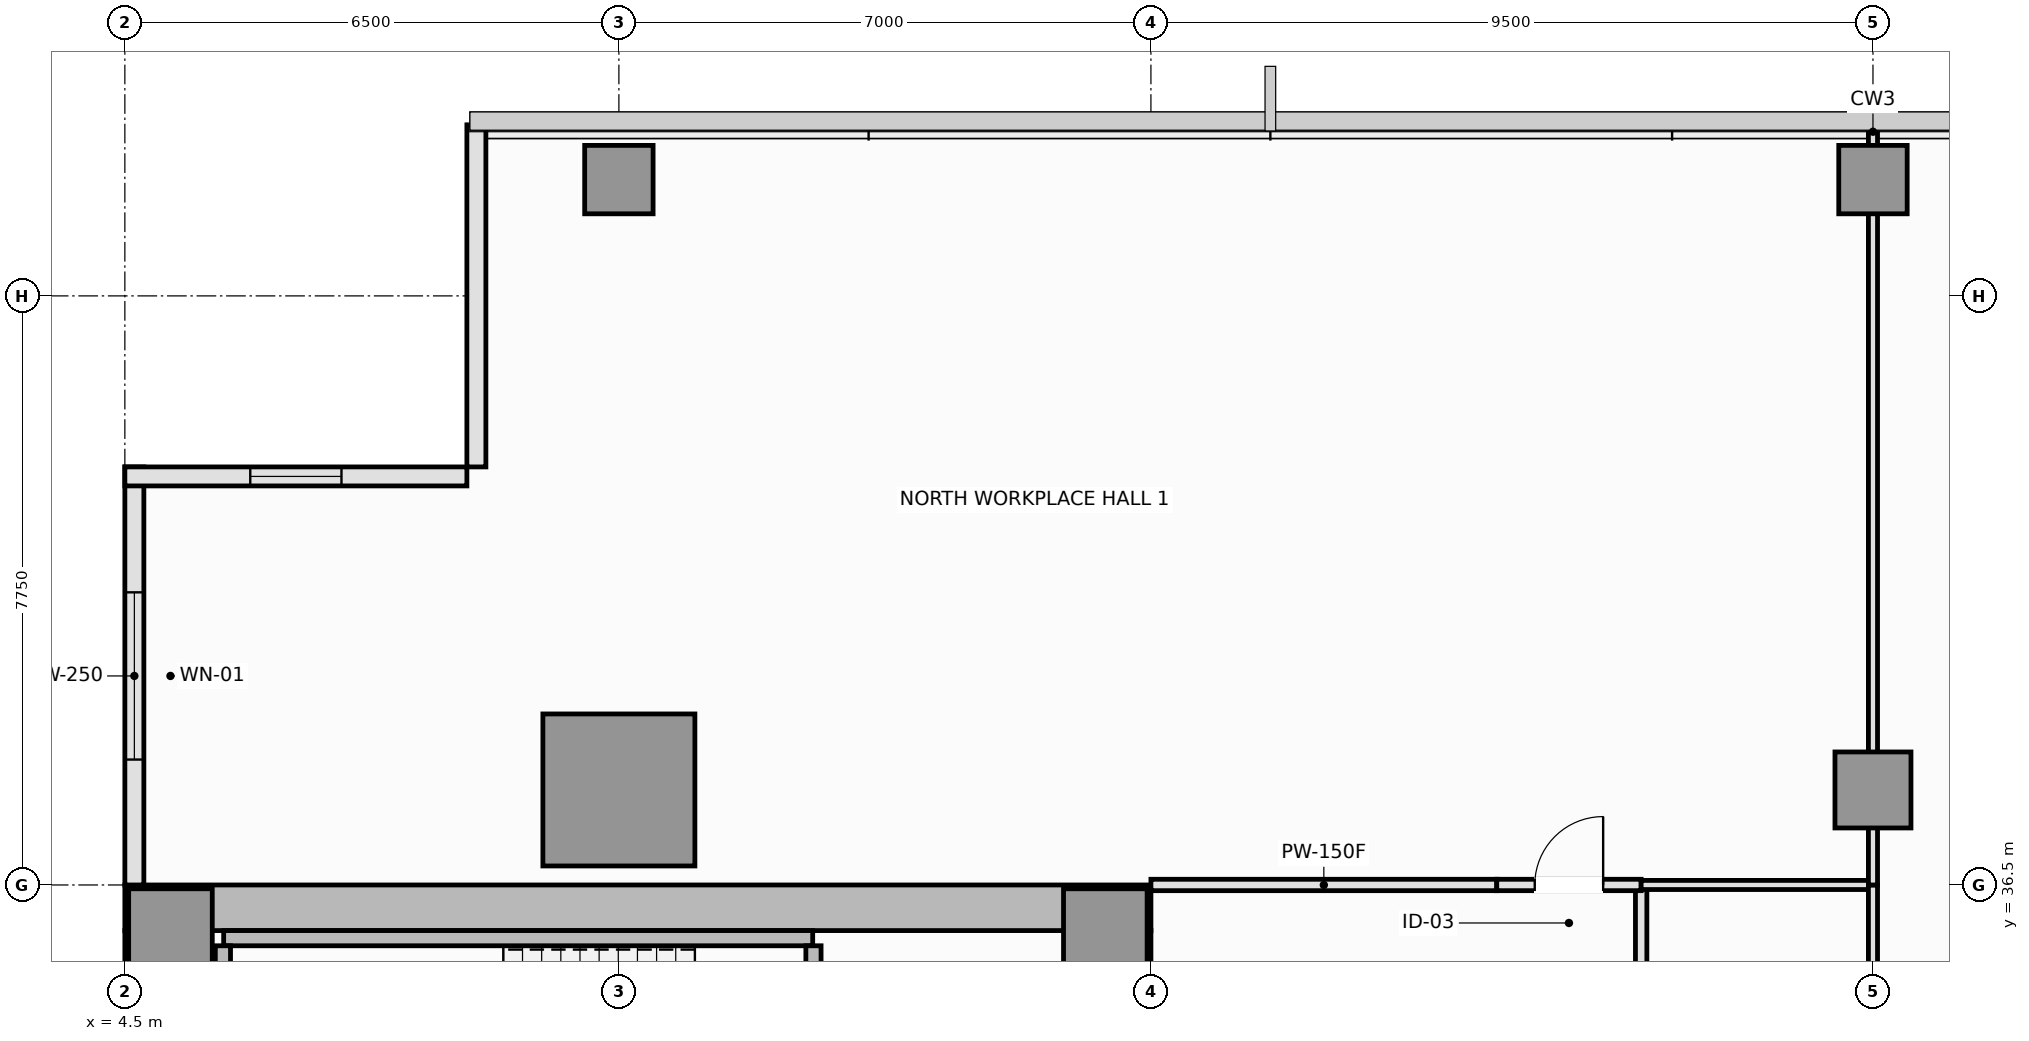
"""IFC4 building model, lengths in metres.
Left out: names, types, materials, properties, quantities, classifications, styles, units other than length and angle.
Written with IfcOpenShell. Run it as: python <this file> out.ifc"""

import sys

from ifc_helpers import new_model, si_unit, direction, frame, frame_2d, origin, origin_2d, place, context, subcontext, project, spatial, rectangle, extrude, element, fill, save


model = new_model("IFC4")
c1 = context("Model", 3, precision=1e-05, world=origin(), true_north=direction((0.0, 1.0)))
c2 = subcontext(c1, "Body", "Model", "MODEL_VIEW")
j1 = project(units=[si_unit("LENGTHUNIT", "METRE"), si_unit("PLANEANGLEUNIT", "RADIAN")], contexts=[c1])
p1 = place(None, origin())
s1 = spatial("IfcSite", under=j1, at=p1, CompositionType="ELEMENT")
p2 = place(p1, origin())
s2 = spatial("IfcBuilding", under=s1, at=p2, CompositionType="ELEMENT")
p3 = place(p2, frame((0.0, 0.0, 102.25)))
s3 = spatial("IfcBuildingStorey", under=s2, at=p3, CompositionType="ELEMENT", Elevation=102.25)
p4 = place(p3, frame((4.5, 36.2, 0.0), z_axis=(0.0, 0.0, 1.0), x_axis=(1.0, 0.0, 0.0)))
e1 = element("IfcWall", 1, at=p4, inside=s3, PredefinedType="SHEAR", context=c2, shape_type="SweptSolid", body=[
    extrude(rectangle(XDim=13.5, YDim=0.6, at=frame_2d((6.75, 0.0))), origin(), (0.0, 0.0, 1.0), 3.55),
])
p5 = place(p3, frame((4.8, 14.6, 0.0), z_axis=(0.0, 0.0, 1.0), x_axis=(0.0, 1.0, 0.0)))
e2 = element("IfcWall", 2, at=p5, inside=s3, PredefinedType="SHEAR", context=c2, shape_type="SweptSolid", body=[
    extrude(rectangle(XDim=21.3, YDim=0.6, at=frame_2d((10.65, 0.0))), origin(), (0.0, 0.0, 1.0), 3.55),
])
p6 = place(p3, frame((17.7, 27.05, 0.0), z_axis=(0.0, 0.0, 1.0), x_axis=(0.0, 1.0, 0.0)))
e3 = element("IfcWall", 3, at=p6, inside=s3, PredefinedType="SHEAR", context=c2, shape_type="SweptSolid", body=[
    extrude(rectangle(XDim=8.85, YDim=0.6, at=frame_2d((4.425, 0.0))), origin(), (0.0, 0.0, 1.0), 3.55),
])
p7 = place(p6, frame((3.45, 0.0, 0.0)))
e4 = element("IfcOpeningElement", 4, at=p7, cuts=e3, PredefinedType="OPENING", context=c2, shape_type="SweptSolid", body=[
    extrude(rectangle(XDim=1.1, YDim=2.15, at=frame_2d((0.55, 1.075))), frame((0.0, 0.31, 0.0), z_axis=(0.0, -1.0, 0.0), x_axis=(1.0, 0.0, 0.0)), (0.0, 0.0, 1.0), 0.62),
])
for number, where, z_axis, x_axis in (
    (5, (5.1, 35.9, 0.0), (0.0, 0.0, 1.0), (1.0, 0.0, 0.0)),
    (6, (17.4, 35.9, 0.0), (0.0, 0.0, 1.0), (1.0, 0.0, 0.0)),
):
    element("IfcColumn", number, at=place(p3, frame(where, z_axis=z_axis, x_axis=x_axis)), inside=s3, PredefinedType="PILASTER", context=c2, shape_type="SweptSolid", body=[
        extrude(rectangle(XDim=1.1, YDim=1.1, at=origin_2d()), origin(), (0.0, 0.0, 1.0), 3.55),
    ])
p8 = place(p3, frame((11.0, 37.75, 0.0), z_axis=(0.0, 0.0, 1.0), x_axis=(1.0, 0.0, 0.0)))
e7 = element("IfcColumn", 7, at=p8, inside=s3, PredefinedType="COLUMN", context=c2, shape_type="SweptSolid", body=[
    extrude(rectangle(XDim=2.0, YDim=2.0, at=origin_2d()), origin(), (0.0, 0.0, 1.0), 3.55),
])
p9 = place(p3, frame((27.5, 37.75, 0.0), z_axis=(0.0, 0.0, 1.0), x_axis=(1.0, 0.0, 0.0)))
e8 = element("IfcColumn", 8, at=p9, inside=s3, PredefinedType="COLUMN", context=c2, shape_type="SweptSolid", body=[
    extrude(rectangle(XDim=1.0, YDim=1.0, at=origin_2d()), origin(), (0.0, 0.0, 1.0), 3.55),
])
for number, where, z_axis, x_axis in (
    (9, (11.0, 45.78, 0.0), (0.0, 0.0, 1.0), (1.0, 0.0, 0.0)),
    (10, (27.5, 45.78, 0.0), (0.0, 0.0, 1.0), (1.0, 0.0, 0.0)),
):
    element("IfcColumn", number, at=place(p3, frame(where, z_axis=z_axis, x_axis=x_axis)), inside=s3, PredefinedType="COLUMN", context=c2, shape_type="SweptSolid", body=[
        extrude(rectangle(XDim=0.9, YDim=0.9, at=origin_2d()), origin(), (0.0, 0.0, 1.0), 3.55),
    ])
p10 = place(p3, frame((4.625, 42.0, 0.0), z_axis=(0.0, 0.0, 1.0), x_axis=(0.0, -1.0, 0.0)))
e11 = element("IfcWall", 11, at=p10, inside=s3, PredefinedType="SOLIDWALL", context=c2, shape_type="SweptSolid", body=[
    extrude(rectangle(XDim=5.5, YDim=0.25, at=frame_2d((2.75, 0.0))), origin(), (0.0, 0.0, 1.0), 3.37),
])
p11 = place(p10, frame((1.65, 0.0, 0.9)))
e12 = element("IfcOpeningElement", 12, at=p11, cuts=e11, PredefinedType="OPENING", context=c2, shape_type="SweptSolid", body=[
    extrude(rectangle(XDim=2.2, YDim=1.8, at=frame_2d((1.1, 0.9))), frame((0.0, 0.135, 0.0), z_axis=(0.0, -1.0, 0.0), x_axis=(1.0, 0.0, 0.0)), (0.0, 0.0, 1.0), 0.27),
])
p12 = place(p3, frame((9.125, 46.5, 0.0), z_axis=(0.0, 0.0, 1.0), x_axis=(0.0, -1.0, 0.0)))
e13 = element("IfcWall", 13, at=p12, inside=s3, PredefinedType="SOLIDWALL", context=c2, shape_type="SweptSolid", body=[
    extrude(rectangle(XDim=4.5, YDim=0.25, at=frame_2d((2.25, 0.0))), origin(), (0.0, 0.0, 1.0), 3.37),
])
p13 = place(p3, frame((9.0, 41.875, 0.0), z_axis=(0.0, 0.0, 1.0), x_axis=(-1.0, 0.0, 0.0)))
e14 = element("IfcWall", 14, at=p13, inside=s3, PredefinedType="SOLIDWALL", context=c2, shape_type="SweptSolid", body=[
    extrude(rectangle(XDim=4.5, YDim=0.25, at=frame_2d((2.25, 0.0))), origin(), (0.0, 0.0, 1.0), 3.37),
])
p14 = place(p13, frame((1.65, 0.0, 0.9)))
e15 = element("IfcOpeningElement", 15, at=p14, cuts=e14, PredefinedType="OPENING", context=c2, shape_type="SweptSolid", body=[
    extrude(rectangle(XDim=1.2, YDim=1.8, at=frame_2d((0.6, 0.9))), frame((0.0, 0.135, 0.0), z_axis=(0.0, -1.0, 0.0), x_axis=(1.0, 0.0, 0.0)), (0.0, 0.0, 1.0), 0.27),
])
p15 = place(p3, frame((5.8, 35.8, 0.0), z_axis=(0.0, 0.0, 1.0), x_axis=(1.0, 0.0, 0.0)))
e16 = element("IfcWall", 16, at=p15, inside=s3, PredefinedType="SOLIDWALL", context=c2, shape_type="SweptSolid", body=[
    extrude(rectangle(XDim=7.75, YDim=0.2, at=frame_2d((3.875, 0.0))), origin(), (0.0, 0.0, 1.0), 3.55),
])
p16 = place(p3, frame((5.79, 32.65, 0.0), z_axis=(0.0, 0.0, 1.0), x_axis=(0.0, 1.0, 0.0)))
e17 = element("IfcWall", 17, at=p16, inside=s3, PredefinedType="SOLIDWALL", context=c2, shape_type="SweptSolid", body=[
    extrude(rectangle(XDim=3.05, YDim=0.2, at=frame_2d((1.525, 0.0))), origin(), (0.0, 0.0, 1.0), 3.55),
])
p17 = place(p3, frame((13.56, 32.65, 0.0), z_axis=(0.0, 0.0, 1.0), x_axis=(0.0, 1.0, 0.0)))
e18 = element("IfcWall", 18, at=p17, inside=s3, PredefinedType="SOLIDWALL", context=c2, shape_type="SweptSolid", body=[
    extrude(rectangle(XDim=3.05, YDim=0.2, at=frame_2d((1.525, 0.0))), origin(), (0.0, 0.0, 1.0), 3.55),
])
p18 = place(p17, frame((0.95, 0.0, 0.0)))
e19 = element("IfcOpeningElement", 19, at=p18, cuts=e18, PredefinedType="OPENING", context=c2, shape_type="SweptSolid", body=[
    extrude(rectangle(XDim=1.15, YDim=2.15, at=frame_2d((0.575, 1.075))), frame((0.0, 0.11, 0.0), z_axis=(0.0, -1.0, 0.0), x_axis=(1.0, 0.0, 0.0)), (0.0, 0.0, 1.0), 0.22),
])
p19 = place(p3, frame((18.0, 36.5, 0.0), z_axis=(0.0, 0.0, 1.0), x_axis=(1.0, 0.0, 0.0)))
e20 = element("IfcWall", 20, at=p19, inside=s3, PredefinedType="PARTITIONING", context=c2, shape_type="SweptSolid", body=[
    extrude(rectangle(XDim=4.55, YDim=0.15, at=frame_2d((2.275, 0.0))), origin(), (0.0, 0.0, 1.0), 3.37),
])
p20 = place(p3, frame((24.45, 33.0, 0.0), z_axis=(0.0, 0.0, 1.0), x_axis=(0.0, 1.0, 0.0)))
e21 = element("IfcWall", 21, at=p20, inside=s3, PredefinedType="PARTITIONING", context=c2, shape_type="SweptSolid", body=[
    extrude(rectangle(XDim=3.5, YDim=0.15, at=frame_2d((1.75, 0.0))), origin(), (0.0, 0.0, 1.0), 3.37),
])
p21 = place(p20, frame((1.25, 0.0, 0.0)))
e22 = element("IfcOpeningElement", 22, at=p21, cuts=e21, PredefinedType="OPENING", context=c2, shape_type="SweptSolid", body=[
    extrude(rectangle(XDim=1.0, YDim=2.15, at=frame_2d((0.5, 1.075))), frame((0.0, 0.085, 0.0), z_axis=(0.0, -1.0, 0.0), x_axis=(1.0, 0.0, 0.0)), (0.0, 0.0, 1.0), 0.17),
])
p22 = place(p3, frame((22.55, 36.5, 0.0), z_axis=(0.0, 0.0, 1.0), x_axis=(1.0, 0.0, 0.0)))
e23 = element("IfcWall", 23, at=p22, inside=s3, PredefinedType="PARTITIONING", context=c2, shape_type="SweptSolid", body=[
    extrude(rectangle(XDim=1.9, YDim=0.15, at=frame_2d((0.95, 0.0))), origin(), (0.0, 0.0, 1.0), 3.37),
])
p23 = place(p22, frame((0.5, 0.0, 0.0)))
e24 = element("IfcOpeningElement", 24, at=p23, cuts=e23, PredefinedType="OPENING", context=c2, shape_type="SweptSolid", body=[
    extrude(rectangle(XDim=0.9, YDim=2.1, at=frame_2d((0.45, 1.05))), frame((0.0, 0.085, 0.0), z_axis=(0.0, -1.0, 0.0), x_axis=(1.0, 0.0, 0.0)), (0.0, 0.0, 1.0), 0.17),
])
p24 = place(p3, frame((24.45, 36.5, 0.0), z_axis=(0.0, 0.0, 1.0), x_axis=(1.0, 0.0, 0.0)))
e25 = element("IfcWall", 25, at=p24, inside=s3, PredefinedType="PARTITIONING", context=c2, shape_type="SweptSolid", body=[
    extrude(rectangle(XDim=3.05, YDim=0.12, at=frame_2d((1.525, 0.0))), origin(), (0.0, 0.0, 1.0), 3.37),
])
p25 = place(p3, frame((27.5, 33.0, 0.0), z_axis=(0.0, 0.0, 1.0), x_axis=(0.0, 1.0, 0.0)))
e26 = element("IfcWall", 26, at=p25, inside=s3, PredefinedType="PARTITIONING", context=c2, shape_type="SweptSolid", body=[
    extrude(rectangle(XDim=3.5, YDim=0.12, at=frame_2d((1.75, 0.0))), origin(), (0.0, 0.0, 1.0), 3.37),
])
p26 = place(p3, frame((27.5, 36.5, 0.0), z_axis=(0.0, 0.0, 1.0), x_axis=(0.0, 1.0, 0.0)))
e27 = element("IfcWall", 27, at=p26, inside=s3, PredefinedType="PARTITIONING", context=c2, shape_type="SweptSolid", body=[
    extrude(rectangle(XDim=9.99, YDim=0.12, at=frame_2d((4.995, 0.0))), origin(), (0.0, 0.0, 1.0), 2.87),
])
p27 = place(p11, origin())
e28 = element("IfcWindow", 28, at=p27, inside=s3, PartitioningType="SINGLE_PANEL", PredefinedType="WINDOW", context=c2, shape_type="SweptSolid", body=[
    extrude(rectangle(XDim=2.2, YDim=1.8, at=frame_2d((1.1, 0.9))), frame((0.0, 0.03, 0.0), z_axis=(0.0, -1.0, 0.0), x_axis=(1.0, 0.0, 0.0)), (0.0, 0.0, 1.0), 0.06),
])
fill(e12, e28)
p28 = place(p14, origin())
e29 = element("IfcWindow", 29, at=p28, inside=s3, PartitioningType="SINGLE_PANEL", PredefinedType="WINDOW", context=c2, shape_type="SweptSolid", body=[
    extrude(rectangle(XDim=1.2, YDim=1.8, at=frame_2d((0.6, 0.9))), frame((0.0, 0.03, 0.0), z_axis=(0.0, -1.0, 0.0), x_axis=(1.0, 0.0, 0.0)), (0.0, 0.0, 1.0), 0.06),
])
fill(e15, e29)
p29 = place(p23, origin())
e30 = element("IfcDoor", 30, at=p29, inside=s3, OperationType="SINGLE_SWING_RIGHT", PredefinedType="DOOR", context=c2, shape_type="SweptSolid", body=[
    extrude(rectangle(XDim=0.9, YDim=2.1, at=frame_2d((0.45, 1.05))), frame((0.0, 0.025, 0.0), z_axis=(0.0, -1.0, 0.0), x_axis=(1.0, 0.0, 0.0)), (0.0, 0.0, 1.0), 0.05),
])
fill(e24, e30)
save(model, sys.argv[1])
